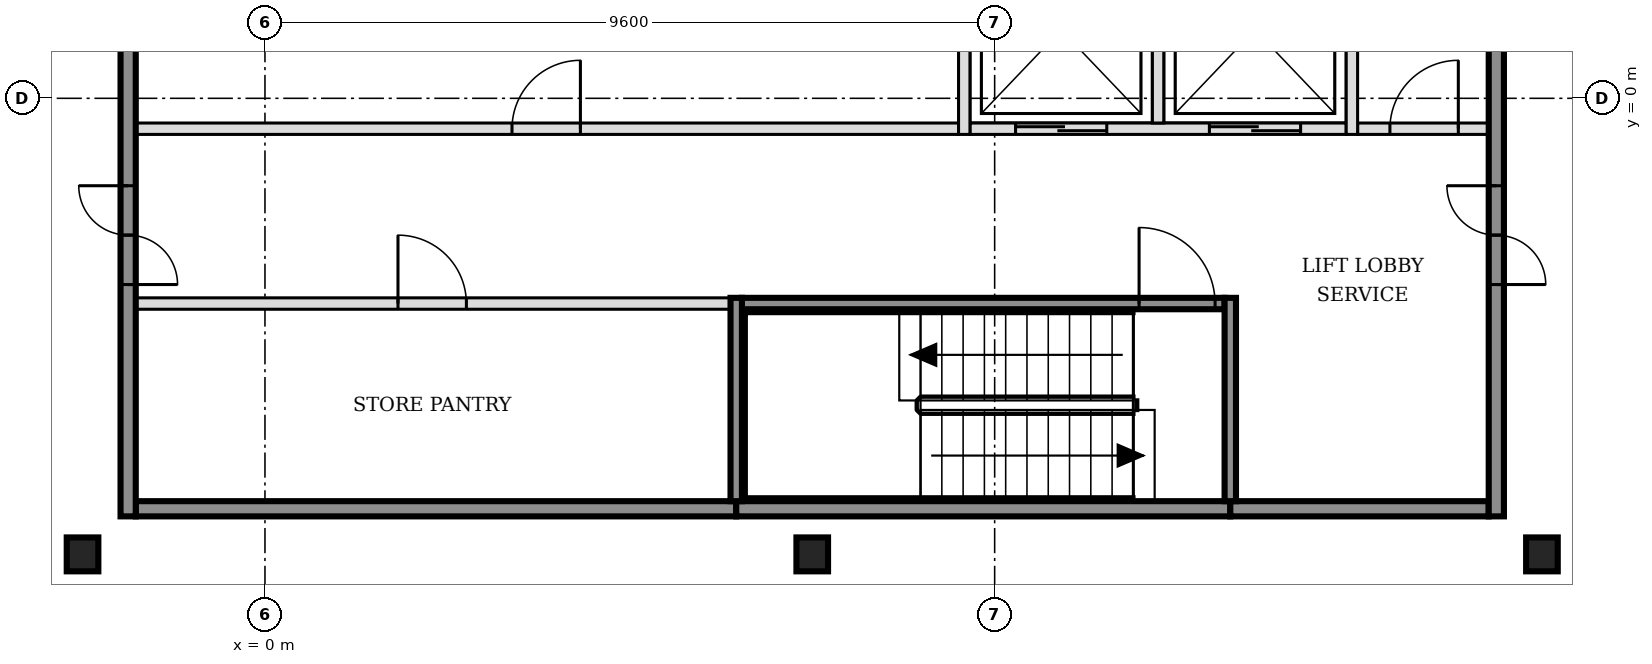
"""IFC4 building model, lengths in metres.
Left out: names, types, materials, properties, quantities, classifications, styles, units other than length and angle.
Written with IfcOpenShell. Run it as: python <this file> out.ifc"""

import sys

from ifc_helpers import new_model, si_unit, direction, frame, frame_2d, origin, origin_2d, place, context, subcontext, project, spatial, rectangle, i_section, extrude, element, fill, save


model = new_model("IFC4")
c1 = context("Model", 3, precision=1e-05, world=origin(), true_north=direction((0.0, 1.0)))
c2 = subcontext(c1, "Body", "Model", "MODEL_VIEW")
j1 = project(units=[si_unit("LENGTHUNIT", "METRE"), si_unit("PLANEANGLEUNIT", "RADIAN")], contexts=[c1])
p1 = place(None, origin())
s1 = spatial("IfcSite", under=j1, at=p1, CompositionType="ELEMENT")
p2 = place(p1, origin())
s2 = spatial("IfcBuilding", under=s1, at=p2, CompositionType="ELEMENT")
p3 = place(p2, frame((0.0, 0.0, 190.2)))
s3 = spatial("IfcBuildingStorey", under=s2, at=p3, CompositionType="ELEMENT", Elevation=190.2)
for number, where, z_axis, x_axis in (
    (1, (-2.4, -6.0, -0.15), (0.0, 0.0, 1.0), (1.0, 0.0, 0.0)),
    (2, (7.2, -6.0, -0.15), (0.0, 0.0, 1.0), (1.0, 0.0, 0.0)),
    (3, (16.8, -6.0, -0.15), (0.0, 0.0, 1.0), (1.0, 0.0, 0.0)),
):
    element("IfcColumn", number, at=place(p3, frame(where, z_axis=z_axis, x_axis=x_axis)), inside=s3, PredefinedType="COLUMN", context=c2, shape_type="SweptSolid", body=[
        extrude(i_section(OverallWidth=0.416, OverallDepth=0.446, WebThickness=0.039, FlangeThickness=0.063, FilletRadius=0.015, at=origin_2d()), origin(), (0.0, 0.0, 1.0), 3.6),
    ])
p4 = place(p3, frame((-1.7, -5.4, 0.0), z_axis=(0.0, 0.0, 1.0), x_axis=(1.0, 0.0, 0.0)))
e4 = element("IfcWall", 4, at=p4, inside=s3, PredefinedType="SOLIDWALL", context=c2, shape_type="SweptSolid", body=[
    extrude(rectangle(XDim=7.9, YDim=0.2, at=frame_2d((3.95, 0.0))), origin(), (0.0, 0.0, 1.0), 3.45),
])
p5 = place(p3, frame((6.2, -5.4, 0.0), z_axis=(0.0, 0.0, 1.0), x_axis=(1.0, 0.0, 0.0)))
e5 = element("IfcWall", 5, at=p5, inside=s3, PredefinedType="SOLIDWALL", context=c2, shape_type="SweptSolid", body=[
    extrude(rectangle(XDim=6.5, YDim=0.2, at=frame_2d((3.25, 0.0))), origin(), (0.0, 0.0, 1.0), 3.45),
])
p6 = place(p3, frame((12.7, -5.4, 0.0), z_axis=(0.0, 0.0, 1.0), x_axis=(1.0, 0.0, 0.0)))
e6 = element("IfcWall", 6, at=p6, inside=s3, PredefinedType="SOLIDWALL", context=c2, shape_type="SweptSolid", body=[
    extrude(rectangle(XDim=3.4, YDim=0.2, at=frame_2d((1.7, 0.0))), origin(), (0.0, 0.0, 1.0), 3.45),
])
p7 = place(p3, frame((-1.7, -2.7, 0.0), z_axis=(0.0, 0.0, 1.0), x_axis=(1.0, 0.0, 0.0)))
e7 = element("IfcWall", 7, at=p7, inside=s3, PredefinedType="PARTITIONING", context=c2, shape_type="SweptSolid", body=[
    extrude(rectangle(XDim=7.825, YDim=0.15, at=frame_2d((3.913, 0.0))), origin(), (0.0, 0.0, 1.0), 3.45),
])
p8 = place(p7, frame((3.45, 0.0, 0.0)))
e8 = element("IfcOpeningElement", 8, at=p8, cuts=e7, PredefinedType="OPENING", context=c2, shape_type="SweptSolid", body=[
    extrude(rectangle(XDim=0.9, YDim=2.1, at=frame_2d((0.45, 1.05))), frame((0.0, 0.085, 0.0), z_axis=(0.0, -1.0, 0.0), x_axis=(1.0, 0.0, 0.0)), (0.0, 0.0, 1.0), 0.17),
])
p9 = place(p3, frame((6.275, -2.7, 0.0), z_axis=(0.0, 0.0, 1.0), x_axis=(1.0, 0.0, 0.0)))
e9 = element("IfcWall", 9, at=p9, inside=s3, PredefinedType="SOLIDWALL", context=c2, shape_type="SweptSolid", body=[
    extrude(rectangle(XDim=6.35, YDim=0.15, at=frame_2d((3.175, 0.0))), origin(), (0.0, 0.0, 1.0), 3.45),
])
p10 = place(p9, frame((5.225, 0.0, 0.0)))
e10 = element("IfcOpeningElement", 10, at=p10, cuts=e9, PredefinedType="OPENING", context=c2, shape_type="SweptSolid", body=[
    extrude(rectangle(XDim=1.0, YDim=2.1, at=frame_2d((0.5, 1.05))), frame((0.0, 0.085, 0.0), z_axis=(0.0, -1.0, 0.0), x_axis=(1.0, 0.0, 0.0)), (0.0, 0.0, 1.0), 0.17),
])
p11 = place(p3, frame((-1.7, -0.4, 0.0), z_axis=(0.0, 0.0, 1.0), x_axis=(1.0, 0.0, 0.0)))
e11 = element("IfcWall", 11, at=p11, inside=s3, PredefinedType="PARTITIONING", context=c2, shape_type="SweptSolid", body=[
    extrude(rectangle(XDim=10.825, YDim=0.15, at=frame_2d((5.413, 0.0))), origin(), (0.0, 0.0, 1.0), 3.45),
])
p12 = place(p11, frame((4.95, 0.0, 0.0)))
e12 = element("IfcOpeningElement", 12, at=p12, cuts=e11, PredefinedType="OPENING", context=c2, shape_type="SweptSolid", body=[
    extrude(rectangle(XDim=0.9, YDim=2.1, at=frame_2d((0.45, 1.05))), frame((0.0, 0.085, 0.0), z_axis=(0.0, -1.0, 0.0), x_axis=(1.0, 0.0, 0.0)), (0.0, 0.0, 1.0), 0.17),
])
p13 = place(p3, frame((9.275, -0.4, 0.0), z_axis=(0.0, 0.0, 1.0), x_axis=(1.0, 0.0, 0.0)))
e13 = element("IfcWall", 13, at=p13, inside=s3, PredefinedType="SOLIDWALL", context=c2, shape_type="SweptSolid", body=[
    extrude(rectangle(XDim=4.95, YDim=0.15, at=frame_2d((2.475, 0.0))), origin(), (0.0, 0.0, 1.0), 3.45),
])
p14 = place(p13, frame((0.6, 0.0, 0.0)))
e14 = element("IfcOpeningElement", 14, at=p14, cuts=e13, PredefinedType="OPENING", context=c2, shape_type="SweptSolid", body=[
    extrude(rectangle(XDim=1.2, YDim=2.1, at=frame_2d((0.6, 1.05))), frame((0.0, 0.085, 0.0), z_axis=(0.0, -1.0, 0.0), x_axis=(1.0, 0.0, 0.0)), (0.0, 0.0, 1.0), 0.17),
])
p15 = place(p13, frame((3.15, 0.0, 0.0)))
e15 = element("IfcOpeningElement", 15, at=p15, cuts=e13, PredefinedType="OPENING", context=c2, shape_type="SweptSolid", body=[
    extrude(rectangle(XDim=1.2, YDim=2.1, at=frame_2d((0.6, 1.05))), frame((0.0, 0.085, 0.0), z_axis=(0.0, -1.0, 0.0), x_axis=(1.0, 0.0, 0.0)), (0.0, 0.0, 1.0), 0.17),
])
p16 = place(p3, frame((14.375, -0.4, 0.0), z_axis=(0.0, 0.0, 1.0), x_axis=(1.0, 0.0, 0.0)))
e16 = element("IfcWall", 16, at=p16, inside=s3, PredefinedType="PARTITIONING", context=c2, shape_type="SweptSolid", body=[
    extrude(rectangle(XDim=1.725, YDim=0.15, at=frame_2d((0.863, 0.0))), origin(), (0.0, 0.0, 1.0), 3.45),
])
p17 = place(p16, frame((0.425, 0.0, 0.0)))
e17 = element("IfcOpeningElement", 17, at=p17, cuts=e16, PredefinedType="OPENING", context=c2, shape_type="SweptSolid", body=[
    extrude(rectangle(XDim=0.9, YDim=2.1, at=frame_2d((0.45, 1.05))), frame((0.0, 0.085, 0.0), z_axis=(0.0, -1.0, 0.0), x_axis=(1.0, 0.0, 0.0)), (0.0, 0.0, 1.0), 0.17),
])
p18 = place(p3, frame((-1.8, -5.5, 0.0), z_axis=(0.0, 0.0, 1.0), x_axis=(0.0, 1.0, 0.0)))
e18 = element("IfcWall", 18, at=p18, inside=s3, PredefinedType="SOLIDWALL", context=c2, shape_type="SweptSolid", body=[
    extrude(rectangle(XDim=15.8, YDim=0.2, at=frame_2d((7.9, 0.0))), origin(), (0.0, 0.0, 1.0), 3.45),
])
p19 = place(p18, frame((3.05, 0.0, 0.0)))
e19 = element("IfcOpeningElement", 19, at=p19, cuts=e18, PredefinedType="OPENING", context=c2, shape_type="SweptSolid", body=[
    extrude(rectangle(XDim=1.3, YDim=2.1, at=frame_2d((0.65, 1.05))), frame((0.0, 0.11, 0.0), z_axis=(0.0, -1.0, 0.0), x_axis=(1.0, 0.0, 0.0)), (0.0, 0.0, 1.0), 0.22),
])
p20 = place(p18, frame((11.45, 0.0, 0.0)))
e20 = element("IfcOpeningElement", 20, at=p20, cuts=e18, PredefinedType="OPENING", context=c2, shape_type="SweptSolid", body=[
    extrude(rectangle(XDim=1.3, YDim=2.1, at=frame_2d((0.65, 1.05))), frame((0.0, 0.11, 0.0), z_axis=(0.0, -1.0, 0.0), x_axis=(1.0, 0.0, 0.0)), (0.0, 0.0, 1.0), 0.22),
])
p21 = place(p3, frame((6.2, -5.3, 0.0), z_axis=(0.0, 0.0, 1.0), x_axis=(0.0, 1.0, 0.0)))
e21 = element("IfcWall", 21, at=p21, inside=s3, PredefinedType="SOLIDWALL", context=c2, shape_type="SweptSolid", body=[
    extrude(rectangle(XDim=2.675, YDim=0.15, at=frame_2d((1.337, 0.0))), origin(), (0.0, 0.0, 1.0), 3.45),
])
p22 = place(p3, frame((9.2, -0.475, 0.0), z_axis=(0.0, 0.0, 1.0), x_axis=(0.0, 1.0, 0.0)))
e22 = element("IfcWall", 22, at=p22, inside=s3, PredefinedType="SOLIDWALL", context=c2, shape_type="SweptSolid", body=[
    extrude(rectangle(XDim=2.6, YDim=0.15, at=frame_2d((1.3, 0.0))), origin(), (0.0, 0.0, 1.0), 3.45),
])
p23 = place(p3, frame((11.75, -0.325, 0.0), z_axis=(0.0, 0.0, 1.0), x_axis=(0.0, 1.0, 0.0)))
e23 = element("IfcWall", 23, at=p23, inside=s3, PredefinedType="SOLIDWALL", context=c2, shape_type="SweptSolid", body=[
    extrude(rectangle(XDim=2.45, YDim=0.15, at=frame_2d((1.225, 0.0))), origin(), (0.0, 0.0, 1.0), 3.45),
])
p24 = place(p3, frame((12.7, -5.3, 0.0), z_axis=(0.0, 0.0, 1.0), x_axis=(0.0, 1.0, 0.0)))
e24 = element("IfcWall", 24, at=p24, inside=s3, PredefinedType="SOLIDWALL", context=c2, shape_type="SweptSolid", body=[
    extrude(rectangle(XDim=2.675, YDim=0.15, at=frame_2d((1.337, 0.0))), origin(), (0.0, 0.0, 1.0), 3.45),
])
p25 = place(p3, frame((14.3, -0.475, 0.0), z_axis=(0.0, 0.0, 1.0), x_axis=(0.0, 1.0, 0.0)))
e25 = element("IfcWall", 25, at=p25, inside=s3, PredefinedType="SOLIDWALL", context=c2, shape_type="SweptSolid", body=[
    extrude(rectangle(XDim=2.75, YDim=0.15, at=frame_2d((1.375, 0.0))), origin(), (0.0, 0.0, 1.0), 3.45),
])
p26 = place(p3, frame((16.2, -5.5, 0.0), z_axis=(0.0, 0.0, 1.0), x_axis=(0.0, 1.0, 0.0)))
e26 = element("IfcWall", 26, at=p26, inside=s3, PredefinedType="SOLIDWALL", context=c2, shape_type="SweptSolid", body=[
    extrude(rectangle(XDim=15.8, YDim=0.2, at=frame_2d((7.9, 0.0))), origin(), (0.0, 0.0, 1.0), 3.45),
])
p27 = place(p26, frame((3.05, 0.0, 0.0)))
e27 = element("IfcOpeningElement", 27, at=p27, cuts=e26, PredefinedType="OPENING", context=c2, shape_type="SweptSolid", body=[
    extrude(rectangle(XDim=1.3, YDim=2.1, at=frame_2d((0.65, 1.05))), frame((0.0, 0.11, 0.0), z_axis=(0.0, -1.0, 0.0), x_axis=(1.0, 0.0, 0.0)), (0.0, 0.0, 1.0), 0.22),
])
p28 = place(p26, frame((11.45, 0.0, 0.0)))
e28 = element("IfcOpeningElement", 28, at=p28, cuts=e26, PredefinedType="OPENING", context=c2, shape_type="SweptSolid", body=[
    extrude(rectangle(XDim=1.3, YDim=2.1, at=frame_2d((0.65, 1.05))), frame((0.0, 0.11, 0.0), z_axis=(0.0, -1.0, 0.0), x_axis=(1.0, 0.0, 0.0)), (0.0, 0.0, 1.0), 0.22),
])
p29 = place(p14, origin())
e29 = element("IfcDoor", 29, at=p29, inside=s3, OperationType="DOUBLE_DOOR_SLIDING", PredefinedType="DOOR", context=c2, shape_type="SweptSolid", body=[
    extrude(rectangle(XDim=1.2, YDim=2.1, at=frame_2d((0.6, 1.05))), frame((0.0, 0.025, 0.0), z_axis=(0.0, -1.0, 0.0), x_axis=(1.0, 0.0, 0.0)), (0.0, 0.0, 1.0), 0.05),
])
fill(e14, e29)
p30 = place(p15, origin())
e30 = element("IfcDoor", 30, at=p30, inside=s3, OperationType="DOUBLE_DOOR_SLIDING", PredefinedType="DOOR", context=c2, shape_type="SweptSolid", body=[
    extrude(rectangle(XDim=1.2, YDim=2.1, at=frame_2d((0.6, 1.05))), frame((0.0, 0.025, 0.0), z_axis=(0.0, -1.0, 0.0), x_axis=(1.0, 0.0, 0.0)), (0.0, 0.0, 1.0), 0.05),
])
fill(e15, e30)
p31 = place(p10, origin())
e31 = element("IfcDoor", 31, at=p31, inside=s3, OperationType="SINGLE_SWING_LEFT", PredefinedType="DOOR", context=c2, shape_type="SweptSolid", body=[
    extrude(rectangle(XDim=1.0, YDim=2.1, at=frame_2d((0.5, 1.05))), frame((0.0, 0.025, 0.0), z_axis=(0.0, -1.0, 0.0), x_axis=(1.0, 0.0, 0.0)), (0.0, 0.0, 1.0), 0.05),
])
fill(e10, e31)
p32 = place(p19, origin())
e32 = element("IfcDoor", 32, at=p32, inside=s3, OperationType="DOUBLE_DOOR_SINGLE_SWING", PredefinedType="DOOR", context=c2, shape_type="SweptSolid", body=[
    extrude(rectangle(XDim=1.3, YDim=2.1, at=frame_2d((0.65, 1.05))), frame((0.0, 0.025, 0.0), z_axis=(0.0, -1.0, 0.0), x_axis=(1.0, 0.0, 0.0)), (0.0, 0.0, 1.0), 0.05),
])
fill(e19, e32)
p33 = place(p27, origin())
e33 = element("IfcDoor", 33, at=p33, inside=s3, OperationType="DOUBLE_DOOR_SINGLE_SWING", PredefinedType="DOOR", context=c2, shape_type="SweptSolid", body=[
    extrude(rectangle(XDim=1.3, YDim=2.1, at=frame_2d((0.65, 1.05))), frame((0.0, 0.025, 0.0), z_axis=(0.0, -1.0, 0.0), x_axis=(1.0, 0.0, 0.0)), (0.0, 0.0, 1.0), 0.05),
])
fill(e27, e33)
p34 = place(p17, origin())
e34 = element("IfcDoor", 34, at=p34, inside=s3, OperationType="SINGLE_SWING_RIGHT", PredefinedType="DOOR", context=c2, shape_type="SweptSolid", body=[
    extrude(rectangle(XDim=0.9, YDim=2.1, at=frame_2d((0.45, 1.05))), frame((0.0, 0.025, 0.0), z_axis=(0.0, -1.0, 0.0), x_axis=(1.0, 0.0, 0.0)), (0.0, 0.0, 1.0), 0.05),
])
fill(e17, e34)
p35 = place(p8, origin())
e35 = element("IfcDoor", 35, at=p35, inside=s3, OperationType="SINGLE_SWING_LEFT", PredefinedType="DOOR", context=c2, shape_type="SweptSolid", body=[
    extrude(rectangle(XDim=0.9, YDim=2.1, at=frame_2d((0.45, 1.05))), frame((0.0, 0.025, 0.0), z_axis=(0.0, -1.0, 0.0), x_axis=(1.0, 0.0, 0.0)), (0.0, 0.0, 1.0), 0.05),
])
fill(e8, e35)
p36 = place(p12, origin())
e36 = element("IfcDoor", 36, at=p36, inside=s3, OperationType="SINGLE_SWING_RIGHT", PredefinedType="DOOR", context=c2, shape_type="SweptSolid", body=[
    extrude(rectangle(XDim=0.9, YDim=2.1, at=frame_2d((0.45, 1.05))), frame((0.0, 0.025, 0.0), z_axis=(0.0, -1.0, 0.0), x_axis=(1.0, 0.0, 0.0)), (0.0, 0.0, 1.0), 0.05),
])
fill(e12, e36)
save(model, sys.argv[1])
